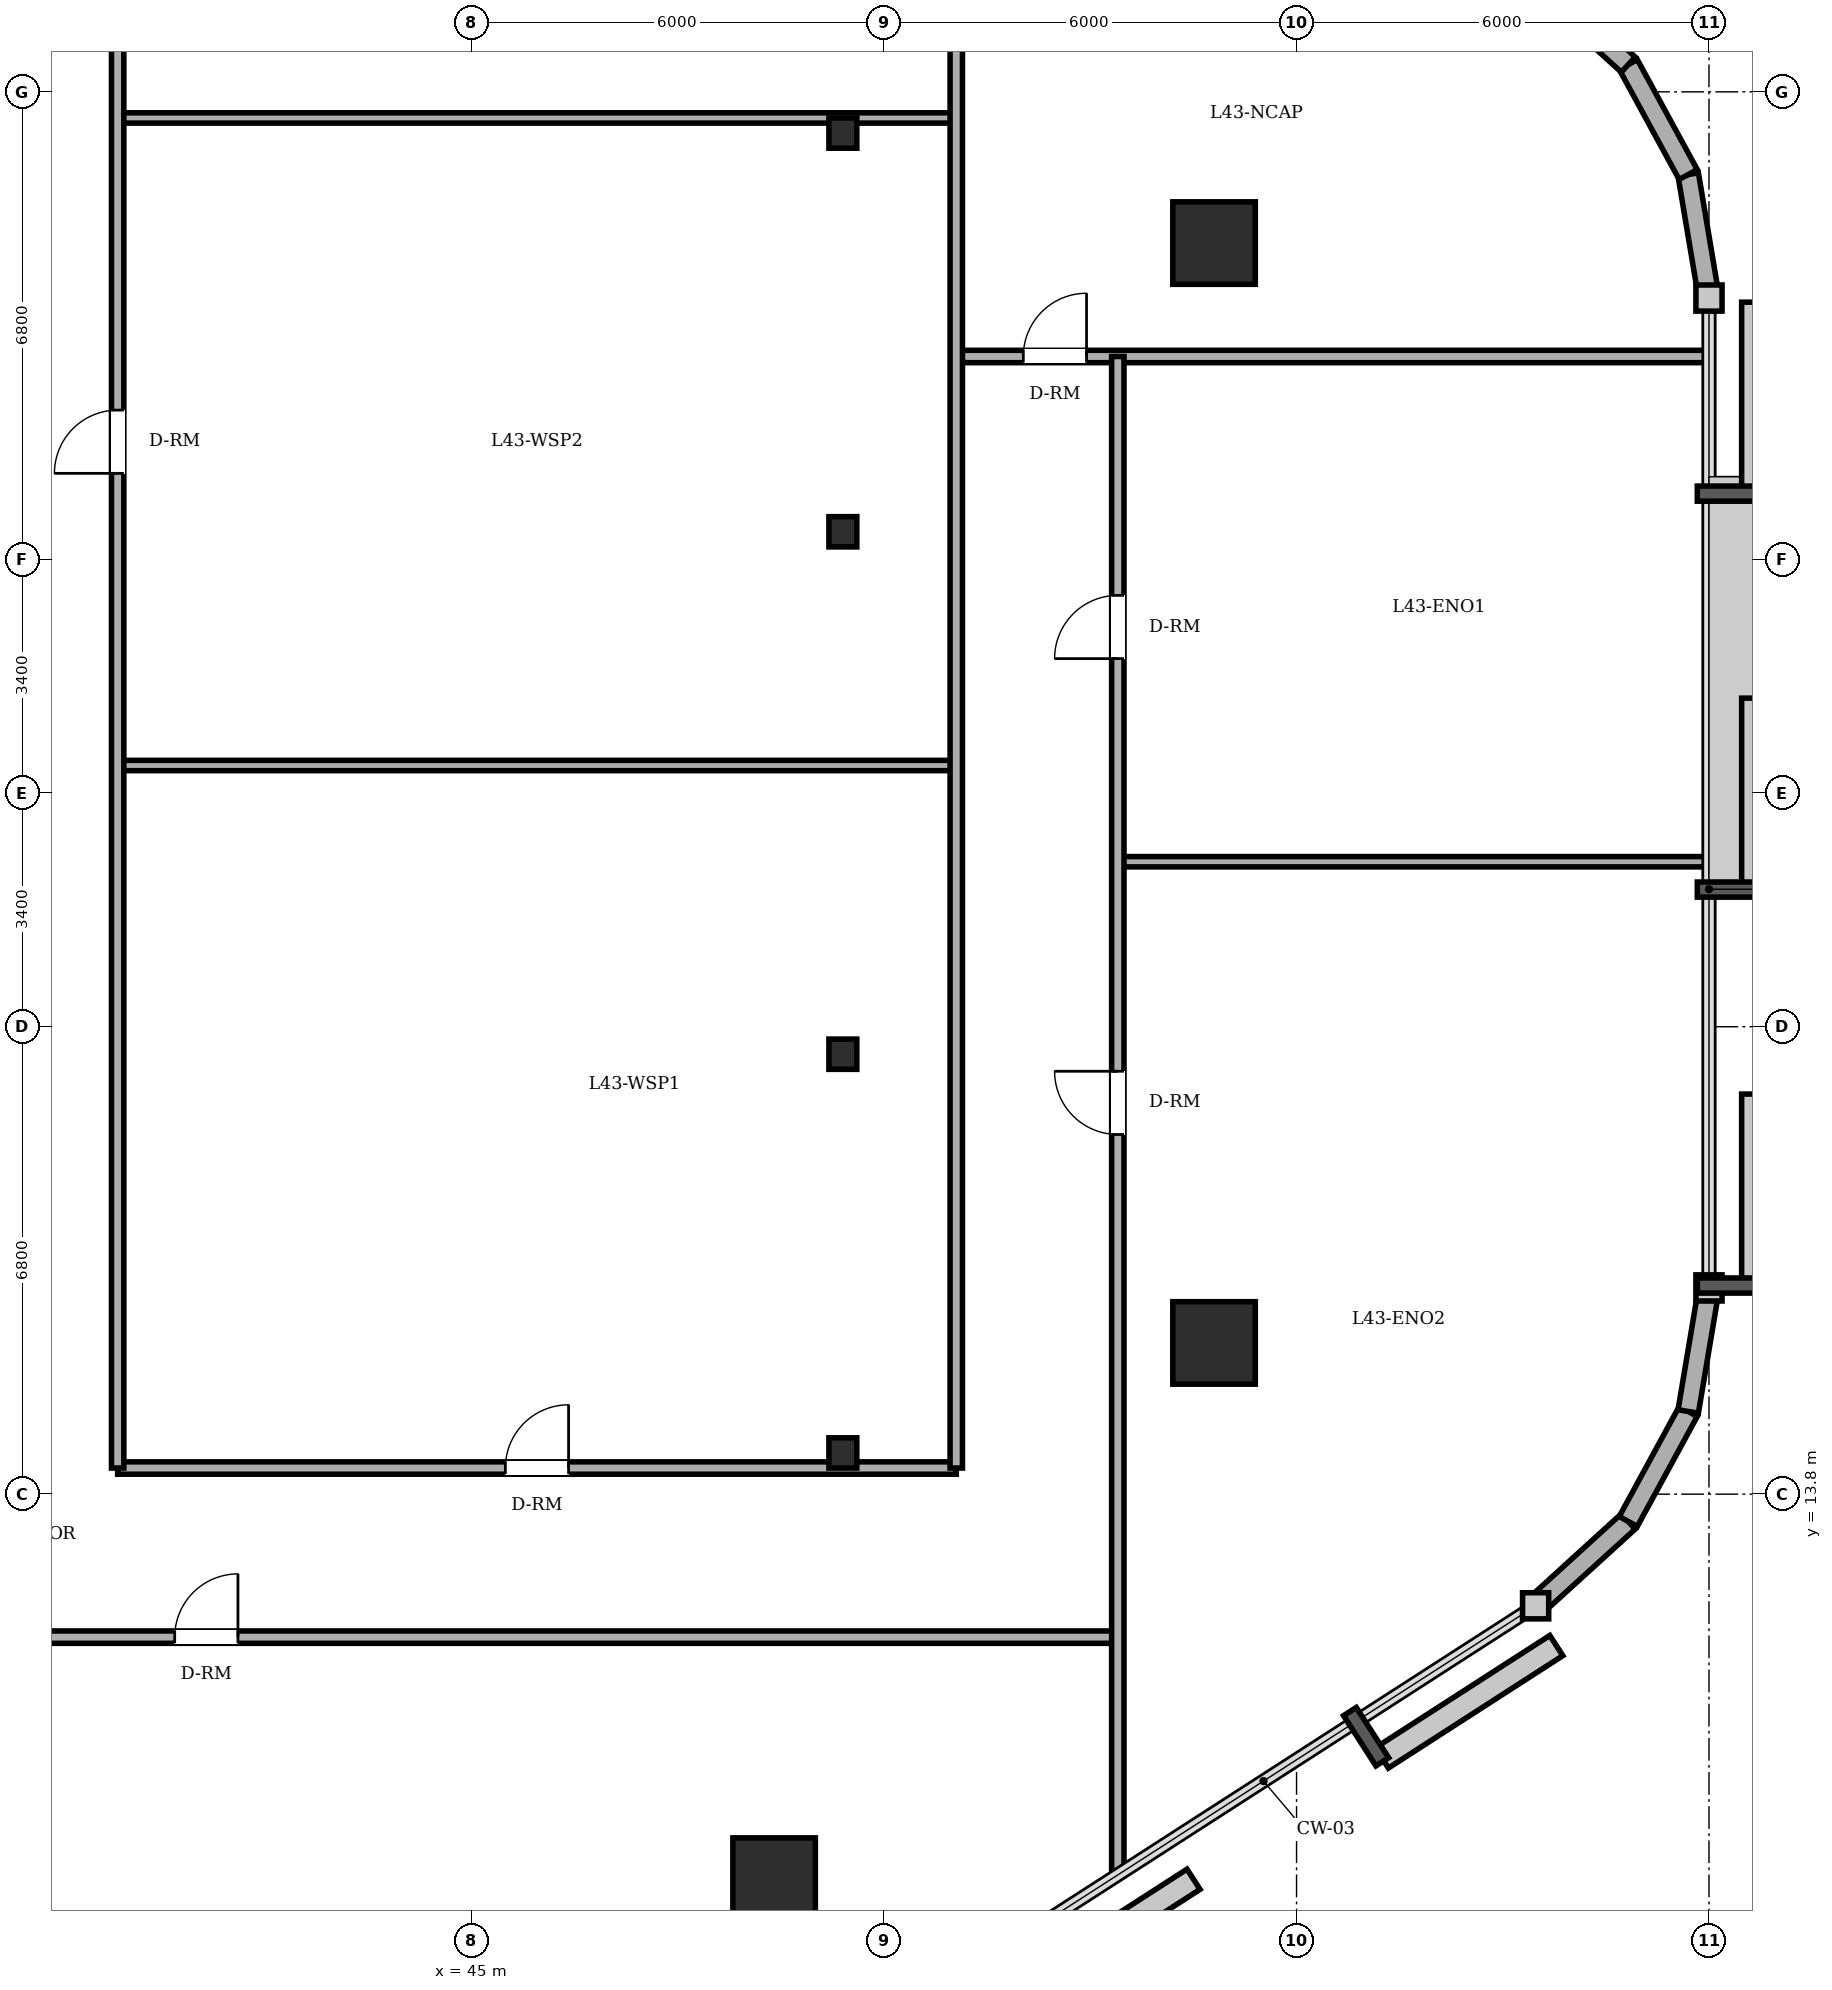
"""IFC4 building model, lengths in metres.
Left out: names, types, materials, properties, quantities, classifications, styles, units other than length and angle.
Written with IfcOpenShell. Run it as: python <this file> out.ifc"""

import sys

from ifc_helpers import new_model, si_unit, direction, frame, frame_2d, origin, origin_2d, place, context, subcontext, project, spatial, rectangle, circle, i_section, extrude, element, fill, save


model = new_model("IFC4")
c1 = context("Model", 3, precision=1e-05, world=origin(), true_north=direction((0.0, 1.0)))
c2 = subcontext(c1, "Body", "Model", "MODEL_VIEW")
j1 = project(units=[si_unit("LENGTHUNIT", "METRE"), si_unit("PLANEANGLEUNIT", "RADIAN")], contexts=[c1])
p1 = place(None, origin())
s1 = spatial("IfcSite", under=j1, at=p1, CompositionType="ELEMENT")
p2 = place(p1, origin())
s2 = spatial("IfcBuilding", under=s1, at=p2, CompositionType="ELEMENT")
p3 = place(p2, frame((0.0, 0.0, 165.4)))
s3 = spatial("IfcBuildingStorey", under=s2, at=p3, CompositionType="ELEMENT", Elevation=165.4)
for number, where, z_axis, x_axis in (
    (1, (49.4, 8.2, 0.0), (0.0, 0.0, 1.0), (1.0, 0.0, 0.0)),
    (2, (55.8, 16.0, 0.0), (0.0, 0.0, 1.0), (1.0, 0.0, 0.0)),
    (3, (55.8, 32.0, 0.0), (0.0, 0.0, 1.0), (1.0, 0.0, 0.0)),
):
    element("IfcColumn", number, at=place(p3, frame(where, z_axis=z_axis, x_axis=x_axis)), inside=s3, PredefinedType="COLUMN", context=c2, shape_type="SweptSolid", body=[
        extrude(circle(Radius=0.6, at=origin_2d()), origin(), (0.0, 0.0, 1.0), 3.6),
    ])
for number, where, z_axis, x_axis in (
    (4, (50.4, 14.4, 0.0), (0.0, 0.0, 1.0), (1.0, 0.0, 0.0)),
    (5, (50.4, 20.2, 0.0), (0.0, 0.0, 1.0), (1.0, 0.0, 0.0)),
    (6, (50.4, 27.8, 0.0), (0.0, 0.0, 1.0), (1.0, 0.0, 0.0)),
    (7, (50.4, 33.6, 0.0), (0.0, 0.0, 1.0), (1.0, 0.0, 0.0)),
):
    element("IfcColumn", number, at=place(p3, frame(where, z_axis=z_axis, x_axis=x_axis)), inside=s3, PredefinedType="COLUMN", context=c2, shape_type="SweptSolid", body=[
        extrude(i_section(OverallWidth=0.406, OverallDepth=0.44, WebThickness=0.024, FlangeThickness=0.039, FilletRadius=0.015, at=origin_2d()), origin(), (0.0, 0.0, 1.0), 3.6),
    ])
p4 = place(p3, frame((60.478, 12.176, 0.0), z_axis=(0.0, 0.0, 1.0), x_axis=(0.73947929393, 0.673179302897, 0.0)))
e8 = element("IfcWall", 8, at=p4, inside=s3, PredefinedType="SOLIDWALL", context=c2, shape_type="SweptSolid", body=[
    extrude(rectangle(XDim=1.823, YDim=0.3, at=frame_2d((0.911, 0.0))), origin(), (0.0, 0.0, 1.0), 3.4),
])
p5 = place(p3, frame((61.826, 13.403, 0.0), z_axis=(0.0, 0.0, 1.0), x_axis=(0.478608030646, 0.878028674362, 0.0)))
e9 = element("IfcWall", 9, at=p5, inside=s3, PredefinedType="SOLIDWALL", context=c2, shape_type="SweptSolid", body=[
    extrude(rectangle(XDim=1.822, YDim=0.3, at=frame_2d((0.911, 0.0))), origin(), (0.0, 0.0, 1.0), 3.4),
])
for number, where, z_axis, x_axis in (
    (10, (62.698, 15.003, 0.0), (0.0, 0.0, 1.0), (0.166, 0.986, 0.0)),
    (11, (63.0, 31.2, 0.0), (0.0, 0.0, 1.0), (-0.166, 0.986, 0.0)),
):
    element("IfcWall", number, at=place(p3, frame(where, z_axis=z_axis, x_axis=x_axis)), inside=s3, PredefinedType="SOLIDWALL", context=c2, shape_type="SweptSolid", body=[
        extrude(rectangle(XDim=1.822, YDim=0.3, at=frame_2d((0.911, 0.0))), origin(), (0.0, 0.0, 1.0), 3.4),
    ])
p6 = place(p3, frame((62.698, 32.997, 0.0), z_axis=(0.0, 0.0, 1.0), x_axis=(-0.478608030646, 0.878028674362, 0.0)))
e12 = element("IfcWall", 12, at=p6, inside=s3, PredefinedType="SOLIDWALL", context=c2, shape_type="SweptSolid", body=[
    extrude(rectangle(XDim=1.822, YDim=0.3, at=frame_2d((0.911, 0.0))), origin(), (0.0, 0.0, 1.0), 3.4),
])
p7 = place(p3, frame((61.826, 34.597, 0.0), z_axis=(0.0, 0.0, 1.0), x_axis=(-0.73947929393, 0.673179302897, 0.0)))
e13 = element("IfcWall", 13, at=p7, inside=s3, PredefinedType="SOLIDWALL", context=c2, shape_type="SweptSolid", body=[
    extrude(rectangle(XDim=1.823, YDim=0.3, at=frame_2d((0.911, 0.0))), origin(), (0.0, 0.0, 1.0), 3.4),
])
p8 = place(p3, frame((13.8, 11.72, 0.0), z_axis=(0.0, 0.0, 1.0), x_axis=(1.0, 0.0, 0.0)))
e14 = element("IfcWall", 14, at=p8, inside=s3, PredefinedType="PARTITIONING", context=c2, shape_type="SweptSolid", body=[
    extrude(rectangle(XDim=40.6, YDim=0.18, at=frame_2d((20.3, 0.0))), origin(), (0.0, 0.0, 1.0), 3.4),
])
p9 = place(p8, frame((12.24, 0.0, 0.0)))
e15 = element("IfcOpeningElement", 15, at=p9, cuts=e14, PredefinedType="OPENING", context=c2, shape_type="SweptSolid", body=[
    extrude(rectangle(XDim=0.92, YDim=2.1, at=frame_2d((0.46, 1.05))), frame((0.0, 0.1, 0.0), z_axis=(0.0, -1.0, 0.0), x_axis=(1.0, 0.0, 0.0)), (0.0, 0.0, 1.0), 0.2),
])
p10 = place(p8, frame((5.54, 0.0, 0.0)))
e16 = element("IfcOpeningElement", 16, at=p10, cuts=e14, PredefinedType="OPENING", context=c2, shape_type="SweptSolid", body=[
    extrude(rectangle(XDim=0.92, YDim=2.1, at=frame_2d((0.46, 1.05))), frame((0.0, 0.1, 0.0), z_axis=(0.0, -1.0, 0.0), x_axis=(1.0, 0.0, 0.0)), (0.0, 0.0, 1.0), 0.2),
])
p11 = place(p8, frame((26.88, 0.0, 0.0)))
e17 = element("IfcOpeningElement", 17, at=p11, cuts=e14, PredefinedType="OPENING", context=c2, shape_type="SweptSolid", body=[
    extrude(rectangle(XDim=0.92, YDim=2.1, at=frame_2d((0.46, 1.05))), frame((0.0, 0.1, 0.0), z_axis=(0.0, -1.0, 0.0), x_axis=(1.0, 0.0, 0.0)), (0.0, 0.0, 1.0), 0.2),
])
p12 = place(p3, frame((39.85, 14.18, 0.0), z_axis=(0.0, 0.0, 1.0), x_axis=(1.0, 0.0, 0.0)))
e18 = element("IfcWall", 18, at=p12, inside=s3, PredefinedType="PARTITIONING", context=c2, shape_type="SweptSolid", body=[
    extrude(rectangle(XDim=12.2, YDim=0.18, at=frame_2d((6.1, 0.0))), origin(), (0.0, 0.0, 1.0), 2.932),
])
p13 = place(p12, frame((5.64, 0.0, 0.0)))
e19 = element("IfcOpeningElement", 19, at=p13, cuts=e18, PredefinedType="OPENING", context=c2, shape_type="SweptSolid", body=[
    extrude(rectangle(XDim=0.92, YDim=2.1, at=frame_2d((0.46, 1.05))), frame((0.0, 0.1, 0.0), z_axis=(0.0, -1.0, 0.0), x_axis=(1.0, 0.0, 0.0)), (0.0, 0.0, 1.0), 0.2),
])
p14 = place(p3, frame((54.4, 23.0, 0.0), z_axis=(0.0, 0.0, 1.0), x_axis=(1.0, 0.0, 0.0)))
e20 = element("IfcWall", 20, at=p14, inside=s3, PredefinedType="PARTITIONING", context=c2, shape_type="SweptSolid", body=[
    extrude(rectangle(XDim=8.6, YDim=0.15, at=frame_2d((4.3, 0.0))), origin(), (0.0, 0.0, 1.0), 3.4),
])
p15 = place(p3, frame((39.85, 24.4, 0.0), z_axis=(0.0, 0.0, 1.0), x_axis=(1.0, 0.0, 0.0)))
e21 = element("IfcWall", 21, at=p15, inside=s3, PredefinedType="PARTITIONING", context=c2, shape_type="SweptSolid", body=[
    extrude(rectangle(XDim=12.2, YDim=0.15, at=frame_2d((6.1, 0.0))), origin(), (0.0, 0.0, 1.0), 3.4),
])
p16 = place(p3, frame((52.05, 30.35, 0.0), z_axis=(0.0, 0.0, 1.0), x_axis=(1.0, 0.0, 0.0)))
e22 = element("IfcWall", 22, at=p16, inside=s3, PredefinedType="PARTITIONING", context=c2, shape_type="SweptSolid", body=[
    extrude(rectangle(XDim=10.95, YDim=0.18, at=frame_2d((5.475, 0.0))), origin(), (0.0, 0.0, 1.0), 3.4),
])
p17 = place(p16, frame((0.975, 0.0, 0.0)))
e23 = element("IfcOpeningElement", 23, at=p17, cuts=e22, PredefinedType="OPENING", context=c2, shape_type="SweptSolid", body=[
    extrude(rectangle(XDim=0.92, YDim=2.1, at=frame_2d((0.46, 1.05))), frame((0.0, 0.1, 0.0), z_axis=(0.0, -1.0, 0.0), x_axis=(1.0, 0.0, 0.0)), (0.0, 0.0, 1.0), 0.2),
])
p18 = place(p3, frame((39.85, 33.82, 0.0), z_axis=(0.0, 0.0, 1.0), x_axis=(1.0, 0.0, 0.0)))
e24 = element("IfcWall", 24, at=p18, inside=s3, PredefinedType="PARTITIONING", context=c2, shape_type="SweptSolid", body=[
    extrude(rectangle(XDim=12.2, YDim=0.15, at=frame_2d((6.1, 0.0))), origin(), (0.0, 0.0, 1.0), 2.932),
])
p19 = place(p3, frame((39.85, 14.18, 0.0), z_axis=(0.0, 0.0, 1.0), x_axis=(0.0, 1.0, 0.0)))
e25 = element("IfcWall", 25, at=p19, inside=s3, PredefinedType="PARTITIONING", context=c2, shape_type="SweptSolid", body=[
    extrude(rectangle(XDim=27.62, YDim=0.18, at=frame_2d((13.81, 0.0))), origin(), (0.0, 0.0, 1.0), 3.4),
])
p20 = place(p19, frame((14.47, 0.0, 0.0)))
e26 = element("IfcOpeningElement", 26, at=p20, cuts=e25, PredefinedType="OPENING", context=c2, shape_type="SweptSolid", body=[
    extrude(rectangle(XDim=0.92, YDim=2.1, at=frame_2d((0.46, 1.05))), frame((0.0, 0.1, 0.0), z_axis=(0.0, -1.0, 0.0), x_axis=(1.0, 0.0, 0.0)), (0.0, 0.0, 1.0), 0.2),
])
p21 = place(p3, frame((52.05, 14.18, 0.0), z_axis=(0.0, 0.0, 1.0), x_axis=(0.0, 1.0, 0.0)))
e27 = element("IfcWall", 27, at=p21, inside=s3, PredefinedType="PARTITIONING", context=c2, shape_type="SweptSolid", body=[
    extrude(rectangle(XDim=27.008, YDim=0.18, at=frame_2d((13.504, 0.0))), origin(), (0.0, 0.0, 1.0), 3.4),
])
p22 = place(p3, frame((54.4, 8.261, 0.0), z_axis=(0.0, 0.0, 1.0), x_axis=(0.0, 1.0, 0.0)))
e28 = element("IfcWall", 28, at=p22, inside=s3, PredefinedType="PARTITIONING", context=c2, shape_type="SweptSolid", body=[
    extrude(rectangle(XDim=22.089, YDim=0.18, at=frame_2d((11.044, 0.0))), origin(), (0.0, 0.0, 1.0), 3.4),
])
p23 = place(p22, frame((17.694, 0.0, 0.0)))
e29 = element("IfcOpeningElement", 29, at=p23, cuts=e28, PredefinedType="OPENING", context=c2, shape_type="SweptSolid", body=[
    extrude(rectangle(XDim=0.92, YDim=2.1, at=frame_2d((0.46, 1.05))), frame((0.0, 0.1, 0.0), z_axis=(0.0, -1.0, 0.0), x_axis=(1.0, 0.0, 0.0)), (0.0, 0.0, 1.0), 0.2),
])
p24 = place(p22, frame((10.771, 0.0, 0.0)))
e30 = element("IfcOpeningElement", 30, at=p24, cuts=e28, PredefinedType="OPENING", context=c2, shape_type="SweptSolid", body=[
    extrude(rectangle(XDim=0.92, YDim=2.1, at=frame_2d((0.46, 1.05))), frame((0.0, 0.1, 0.0), z_axis=(0.0, -1.0, 0.0), x_axis=(1.0, 0.0, 0.0)), (0.0, 0.0, 1.0), 0.2),
])
p25 = place(p13, origin())
e31 = element("IfcDoor", 31, at=p25, inside=s3, OperationType="SINGLE_SWING_RIGHT", PredefinedType="DOOR", context=c2, shape_type="SweptSolid", body=[
    extrude(rectangle(XDim=0.92, YDim=2.1, at=frame_2d((0.46, 1.05))), frame((0.0, 0.025, 0.0), z_axis=(0.0, -1.0, 0.0), x_axis=(1.0, 0.0, 0.0)), (0.0, 0.0, 1.0), 0.05),
])
fill(e19, e31)
p26 = place(p20, origin())
e32 = element("IfcDoor", 32, at=p26, inside=s3, OperationType="SINGLE_SWING_LEFT", PredefinedType="DOOR", context=c2, shape_type="SweptSolid", body=[
    extrude(rectangle(XDim=0.92, YDim=2.1, at=frame_2d((0.46, 1.05))), frame((0.0, 0.025, 0.0), z_axis=(0.0, -1.0, 0.0), x_axis=(1.0, 0.0, 0.0)), (0.0, 0.0, 1.0), 0.05),
])
fill(e26, e32)
p27 = place(p17, origin())
e33 = element("IfcDoor", 33, at=p27, inside=s3, OperationType="SINGLE_SWING_RIGHT", PredefinedType="DOOR", context=c2, shape_type="SweptSolid", body=[
    extrude(rectangle(XDim=0.92, YDim=2.1, at=frame_2d((0.46, 1.05))), frame((0.0, 0.025, 0.0), z_axis=(0.0, -1.0, 0.0), x_axis=(1.0, 0.0, 0.0)), (0.0, 0.0, 1.0), 0.05),
])
fill(e23, e33)
p28 = place(p23, origin())
e34 = element("IfcDoor", 34, at=p28, inside=s3, OperationType="SINGLE_SWING_LEFT", PredefinedType="DOOR", context=c2, shape_type="SweptSolid", body=[
    extrude(rectangle(XDim=0.92, YDim=2.1, at=frame_2d((0.46, 1.05))), frame((0.0, 0.025, 0.0), z_axis=(0.0, -1.0, 0.0), x_axis=(1.0, 0.0, 0.0)), (0.0, 0.0, 1.0), 0.05),
])
fill(e29, e34)
p29 = place(p24, origin())
e35 = element("IfcDoor", 35, at=p29, inside=s3, OperationType="SINGLE_SWING_RIGHT", PredefinedType="DOOR", context=c2, shape_type="SweptSolid", body=[
    extrude(rectangle(XDim=0.92, YDim=2.1, at=frame_2d((0.46, 1.05))), frame((0.0, 0.025, 0.0), z_axis=(0.0, -1.0, 0.0), x_axis=(1.0, 0.0, 0.0)), (0.0, 0.0, 1.0), 0.05),
])
fill(e30, e35)
p30 = place(p11, origin())
e36 = element("IfcDoor", 36, at=p30, inside=s3, OperationType="SINGLE_SWING_RIGHT", PredefinedType="DOOR", context=c2, shape_type="SweptSolid", body=[
    extrude(rectangle(XDim=0.92, YDim=2.1, at=frame_2d((0.46, 1.05))), frame((0.0, 0.025, 0.0), z_axis=(0.0, -1.0, 0.0), x_axis=(1.0, 0.0, 0.0)), (0.0, 0.0, 1.0), 0.05),
])
fill(e17, e36)
save(model, sys.argv[1])
